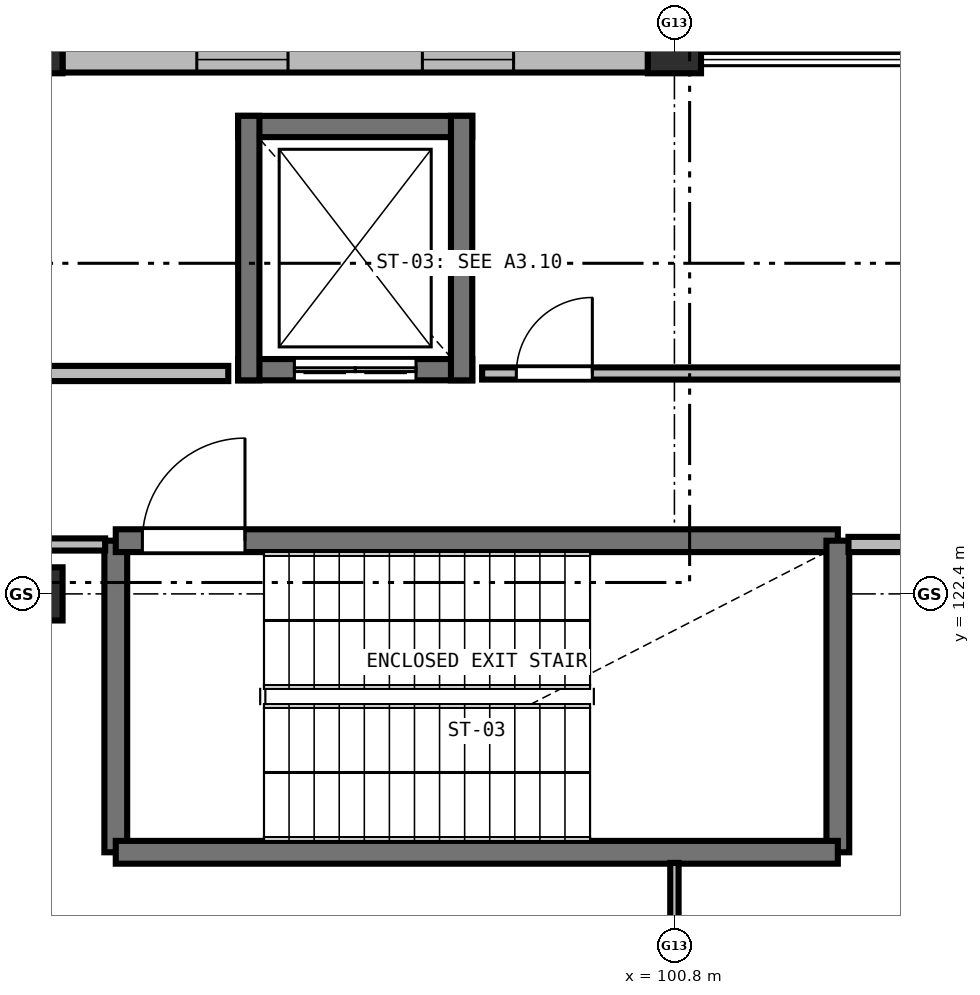
"""IFC4 building model, lengths in metres.
Left out: names, types, materials, properties, quantities, classifications, styles, units other than length and angle.
Written with IfcOpenShell. Run it as: python <this file> out.ifc"""

import sys

from ifc_helpers import new_model, si_unit, direction, frame, frame_2d, origin, origin_2d, place, context, subcontext, project, spatial, rectangle, extrude, element, fill, save


model = new_model("IFC4")
c1 = context("Model", 3, precision=1e-05, world=origin(), true_north=direction((0.0, 1.0)))
c2 = subcontext(c1, "Body", "Model", "MODEL_VIEW")
j1 = project(units=[si_unit("LENGTHUNIT", "METRE"), si_unit("PLANEANGLEUNIT", "RADIAN")], contexts=[c1])
p1 = place(None, origin())
s1 = spatial("IfcSite", under=j1, at=p1, CompositionType="ELEMENT")
p2 = place(p1, origin())
s2 = spatial("IfcBuilding", under=s1, at=p2, CompositionType="ELEMENT")
p3 = place(p2, frame((0.0, 0.0, 5.1)))
s3 = spatial("IfcBuildingStorey", under=s2, at=p3, CompositionType="ELEMENT", Elevation=5.1)
for number, where, z_axis, x_axis in (
    (1, (92.4, 122.4, 0.0), (0.0, 0.0, 1.0), (1.0, 0.0, 0.0)),
    (2, (92.4, 129.6, 0.0), (0.0, 0.0, 1.0), (1.0, 0.0, 0.0)),
    (3, (100.8, 129.6, 0.0), (0.0, 0.0, 1.0), (1.0, 0.0, 0.0)),
):
    element("IfcColumn", number, at=place(p3, frame(where, z_axis=z_axis, x_axis=x_axis)), inside=s3, PredefinedType="COLUMN", context=c2, shape_type="SweptSolid", body=[
        extrude(rectangle(XDim=0.7, YDim=0.7, at=origin_2d()), origin(), (0.0, 0.0, 1.0), 4.2),
    ])
p4 = place(p3, frame((92.748, 129.43, 0.0), z_axis=(0.0, 0.0, 1.0), x_axis=(1.0, 0.0, 0.0)))
e4 = element("IfcWall", 4, at=p4, inside=s3, PredefinedType="SOLIDWALL", context=c2, shape_type="SweptSolid", body=[
    extrude(rectangle(XDim=7.704, YDim=0.34, at=frame_2d((3.852, 0.0))), origin(), (0.0, 0.0, 1.0), 3.11),
])
p5 = place(p4, frame((1.768, 0.0, 0.95)))
e5 = element("IfcOpeningElement", 5, at=p5, cuts=e4, PredefinedType="OPENING", context=c2, shape_type="SweptSolid", body=[
    extrude(rectangle(XDim=1.2, YDim=1.4, at=frame_2d((0.6, 0.7))), frame((0.0, 0.18, 0.0), z_axis=(0.0, -1.0, 0.0), x_axis=(1.0, 0.0, 0.0)), (0.0, 0.0, 1.0), 0.36),
])
p6 = place(p4, frame((4.736, 0.0, 0.95)))
e6 = element("IfcOpeningElement", 6, at=p6, cuts=e4, PredefinedType="OPENING", context=c2, shape_type="SweptSolid", body=[
    extrude(rectangle(XDim=1.2, YDim=1.4, at=frame_2d((0.6, 0.7))), frame((0.0, 0.18, 0.0), z_axis=(0.0, -1.0, 0.0), x_axis=(1.0, 0.0, 0.0)), (0.0, 0.0, 1.0), 0.36),
])
p7 = place(p3, frame((93.45, 119.0, 0.0), z_axis=(0.0, 0.0, 1.0), x_axis=(0.0, 1.0, 0.0)))
e7 = element("IfcWall", 7, at=p7, inside=s3, PredefinedType="SHEAR", context=c2, shape_type="SweptSolid", body=[
    extrude(rectangle(XDim=4.1, YDim=0.3, at=frame_2d((2.05, 0.0))), origin(), (0.0, 0.0, 1.0), 3.92),
])
p8 = place(p3, frame((93.45, 123.1, 0.0), z_axis=(0.0, 0.0, 1.0), x_axis=(1.0, 0.0, 0.0)))
e8 = element("IfcWall", 8, at=p8, inside=s3, PredefinedType="SHEAR", context=c2, shape_type="SweptSolid", body=[
    extrude(rectangle(XDim=9.5, YDim=0.3, at=frame_2d((4.75, 0.0))), origin(), (0.0, 0.0, 1.0), 3.92),
])
p9 = place(p8, frame((0.35, 0.0, 0.0)))
e9 = element("IfcOpeningElement", 9, at=p9, cuts=e8, PredefinedType="OPENING", context=c2, shape_type="SweptSolid", body=[
    extrude(rectangle(XDim=1.35, YDim=2.2, at=frame_2d((0.675, 1.1))), frame((0.0, 0.16, 0.0), z_axis=(0.0, -1.0, 0.0), x_axis=(1.0, 0.0, 0.0)), (0.0, 0.0, 1.0), 0.32),
])
p10 = place(p3, frame((102.95, 123.1, 0.0), z_axis=(0.0, 0.0, 1.0), x_axis=(0.0, -1.0, 0.0)))
e10 = element("IfcWall", 10, at=p10, inside=s3, PredefinedType="SHEAR", context=c2, shape_type="SweptSolid", body=[
    extrude(rectangle(XDim=4.1, YDim=0.3, at=frame_2d((2.05, 0.0))), origin(), (0.0, 0.0, 1.0), 3.92),
])
p11 = place(p3, frame((102.95, 119.0, 0.0), z_axis=(0.0, 0.0, 1.0), x_axis=(-1.0, 0.0, 0.0)))
e11 = element("IfcWall", 11, at=p11, inside=s3, PredefinedType="SHEAR", context=c2, shape_type="SweptSolid", body=[
    extrude(rectangle(XDim=9.5, YDim=0.3, at=frame_2d((4.75, 0.0))), origin(), (0.0, 0.0, 1.0), 3.92),
])
p12 = place(p3, frame((98.14, 125.35, 0.0), z_axis=(0.0, 0.0, 1.0), x_axis=(-1.0, 0.0, 0.0)))
e12 = element("IfcWall", 12, at=p12, inside=s3, PredefinedType="SHEAR", context=c2, shape_type="SweptSolid", body=[
    extrude(rectangle(XDim=3.08, YDim=0.28, at=frame_2d((1.54, 0.0))), origin(), (0.0, 0.0, 1.0), 3.92),
])
p13 = place(p12, frame((0.74, 0.0, 0.0)))
e13 = element("IfcOpeningElement", 13, at=p13, cuts=e12, PredefinedType="OPENING", context=c2, shape_type="SweptSolid", body=[
    extrude(rectangle(XDim=1.6, YDim=2.2, at=frame_2d((0.8, 1.1))), frame((0.0, 0.15, 0.0), z_axis=(0.0, -1.0, 0.0), x_axis=(1.0, 0.0, 0.0)), (0.0, 0.0, 1.0), 0.3),
])
p14 = place(p3, frame((95.06, 128.55, 0.0), z_axis=(0.0, 0.0, 1.0), x_axis=(1.0, 0.0, 0.0)))
e14 = element("IfcWall", 14, at=p14, inside=s3, PredefinedType="SHEAR", context=c2, shape_type="SweptSolid", body=[
    extrude(rectangle(XDim=3.08, YDim=0.28, at=frame_2d((1.54, 0.0))), origin(), (0.0, 0.0, 1.0), 3.92),
])
for number, where, z_axis, x_axis in (
    (15, (95.2, 125.21, 0.0), (0.0, 0.0, 1.0), (0.0, 1.0, 0.0)),
    (16, (98.0, 128.69, 0.0), (0.0, 0.0, 1.0), (0.0, -1.0, 0.0)),
):
    element("IfcWall", number, at=place(p3, frame(where, z_axis=z_axis, x_axis=x_axis)), inside=s3, PredefinedType="SHEAR", context=c2, shape_type="SweptSolid", body=[
        extrude(rectangle(XDim=3.48, YDim=0.28, at=frame_2d((1.74, 0.0))), origin(), (0.0, 0.0, 1.0), 3.92),
    ])
p15 = place(p3, frame((92.4, 125.3, 0.0), z_axis=(0.0, 0.0, 1.0), x_axis=(1.0, 0.0, 0.0)))
e17 = element("IfcWall", 17, at=p15, inside=s3, PredefinedType="SOLIDWALL", context=c2, shape_type="SweptSolid", body=[
    extrude(rectangle(XDim=2.53, YDim=0.2, at=frame_2d((1.265, 0.0))), origin(), (0.0, 0.0, 1.0), 3.305),
])
p16 = place(p3, frame((98.27, 125.3, 0.0), z_axis=(0.0, 0.0, 1.0), x_axis=(1.0, 0.0, 0.0)))
e18 = element("IfcWall", 18, at=p16, inside=s3, PredefinedType="PARTITIONING", context=c2, shape_type="SweptSolid", body=[
    extrude(rectangle(XDim=35.91, YDim=0.16, at=frame_2d((17.955, 0.0))), origin(), (0.0, 0.0, 1.0), 3.305),
])
p17 = place(p16, frame((0.45, 0.0, 0.0)))
e19 = element("IfcOpeningElement", 19, at=p17, cuts=e18, PredefinedType="OPENING", context=c2, shape_type="SweptSolid", body=[
    extrude(rectangle(XDim=1.0, YDim=2.1, at=frame_2d((0.5, 1.05))), frame((0.0, 0.09, 0.0), z_axis=(0.0, -1.0, 0.0), x_axis=(1.0, 0.0, 0.0)), (0.0, 0.0, 1.0), 0.18),
])
p18 = place(p3, frame((93.31, 123.05, 0.0), z_axis=(0.0, 0.0, 1.0), x_axis=(-1.0, 0.0, 0.0)))
e20 = element("IfcWall", 20, at=p18, inside=s3, PredefinedType="PARTITIONING", context=c2, shape_type="SweptSolid", body=[
    extrude(rectangle(XDim=32.22, YDim=0.16, at=frame_2d((16.11, 0.0))), origin(), (0.0, 0.0, 1.0), 3.305),
])
p19 = place(p18, frame((27.385, 0.0, 0.0)))
e21 = element("IfcOpeningElement", 21, at=p19, cuts=e20, PredefinedType="OPENING", context=c2, shape_type="SweptSolid", body=[
    extrude(rectangle(XDim=1.65, YDim=2.2, at=frame_2d((0.825, 1.1))), frame((0.0, 0.09, 0.0), z_axis=(0.0, -1.0, 0.0), x_axis=(1.0, 0.0, 0.0)), (0.0, 0.0, 1.0), 0.18),
])
p20 = place(p3, frame((100.8, 115.545, 0.0), z_axis=(0.0, 0.0, 1.0), x_axis=(0.0, 1.0, 0.0)))
e22 = element("IfcWall", 22, at=p20, inside=s3, PredefinedType="PARTITIONING", context=c2, shape_type="SweptSolid", body=[
    extrude(rectangle(XDim=3.315, YDim=0.11, at=frame_2d((1.658, 0.0))), origin(), (0.0, 0.0, 1.0), 3.105),
])
p21 = place(p3, frame((134.18, 123.05, 0.0), z_axis=(0.0, 0.0, 1.0), x_axis=(-1.0, 0.0, 0.0)))
e23 = element("IfcWall", 23, at=p21, inside=s3, PredefinedType="SOLIDWALL", context=c2, shape_type="SweptSolid", body=[
    extrude(rectangle(XDim=31.09, YDim=0.2, at=frame_2d((15.545, 0.0))), origin(), (0.0, 0.0, 1.0), 3.305),
])
p22 = place(p21, frame((28.53, 0.0, 0.0)))
e24 = element("IfcOpeningElement", 24, at=p22, cuts=e23, PredefinedType="OPENING", context=c2, shape_type="SweptSolid", body=[
    extrude(rectangle(XDim=1.3, YDim=2.15, at=frame_2d((0.65, 1.075))), frame((0.0, 0.11, 0.0), z_axis=(0.0, -1.0, 0.0), x_axis=(1.0, 0.0, 0.0)), (0.0, 0.0, 1.0), 0.22),
])
p23 = place(p5, origin())
e25 = element("IfcWindow", 25, at=p23, inside=s3, PartitioningType="SINGLE_PANEL", PredefinedType="WINDOW", context=c2, shape_type="SweptSolid", body=[
    extrude(rectangle(XDim=1.2, YDim=1.4, at=frame_2d((0.6, 0.7))), frame((0.0, 0.03, 0.0), z_axis=(0.0, -1.0, 0.0), x_axis=(1.0, 0.0, 0.0)), (0.0, 0.0, 1.0), 0.06),
])
fill(e5, e25)
p24 = place(p6, origin())
e26 = element("IfcWindow", 26, at=p24, inside=s3, PartitioningType="SINGLE_PANEL", PredefinedType="WINDOW", context=c2, shape_type="SweptSolid", body=[
    extrude(rectangle(XDim=1.2, YDim=1.4, at=frame_2d((0.6, 0.7))), frame((0.0, 0.03, 0.0), z_axis=(0.0, -1.0, 0.0), x_axis=(1.0, 0.0, 0.0)), (0.0, 0.0, 1.0), 0.06),
])
fill(e6, e26)
p25 = place(p9, origin())
e27 = element("IfcDoor", 27, at=p25, inside=s3, OperationType="SINGLE_SWING_RIGHT", PredefinedType="DOOR", context=c2, shape_type="SweptSolid", body=[
    extrude(rectangle(XDim=1.35, YDim=2.2, at=frame_2d((0.675, 1.1))), frame((0.0, 0.025, 0.0), z_axis=(0.0, -1.0, 0.0), x_axis=(1.0, 0.0, 0.0)), (0.0, 0.0, 1.0), 0.05),
])
fill(e9, e27)
p26 = place(p13, origin())
e28 = element("IfcDoor", 28, at=p26, inside=s3, OperationType="DOUBLE_DOOR_SLIDING", PredefinedType="DOOR", context=c2, shape_type="SweptSolid", body=[
    extrude(rectangle(XDim=1.6, YDim=2.2, at=frame_2d((0.8, 1.1))), frame((0.0, 0.025, 0.0), z_axis=(0.0, -1.0, 0.0), x_axis=(1.0, 0.0, 0.0)), (0.0, 0.0, 1.0), 0.05),
])
fill(e13, e28)
p27 = place(p17, origin())
e29 = element("IfcDoor", 29, at=p27, inside=s3, OperationType="SINGLE_SWING_RIGHT", PredefinedType="DOOR", context=c2, shape_type="SweptSolid", body=[
    extrude(rectangle(XDim=1.0, YDim=2.1, at=frame_2d((0.5, 1.05))), frame((0.0, 0.025, 0.0), z_axis=(0.0, -1.0, 0.0), x_axis=(1.0, 0.0, 0.0)), (0.0, 0.0, 1.0), 0.05),
])
fill(e19, e29)
save(model, sys.argv[1])
